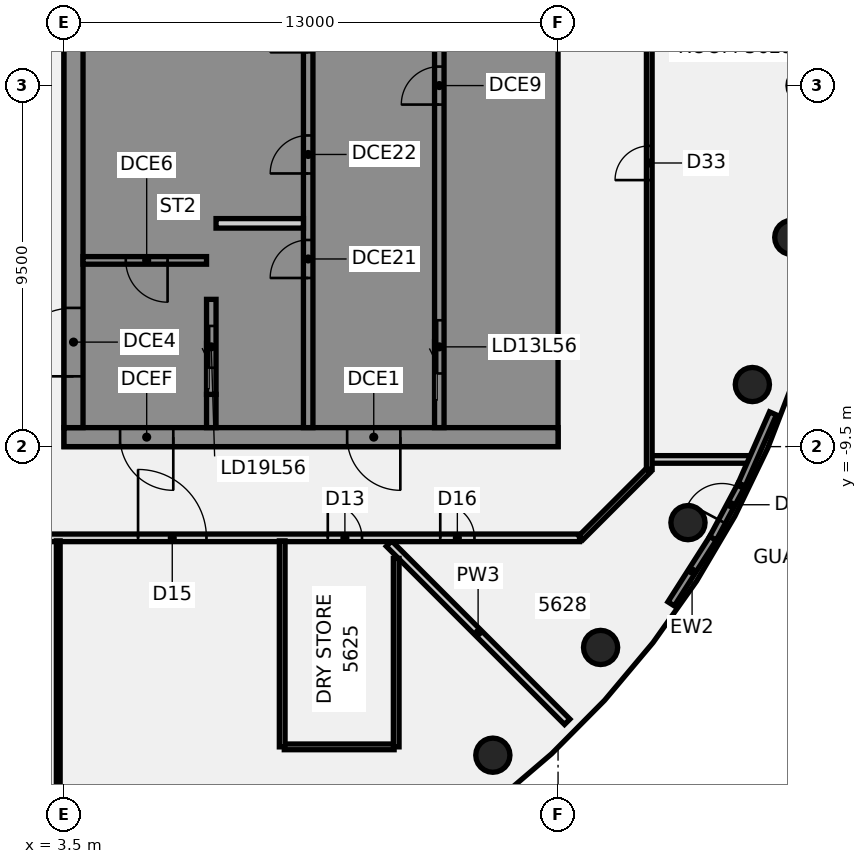
"""IFC4 building model, lengths in metres.
Left out: names, types, materials, properties, quantities, classifications, styles, units other than length and angle.
Written with IfcOpenShell. Run it as: python <this file> out.ifc"""

import sys

from ifc_helpers import new_model, si_unit, direction, frame, frame_2d, origin, origin_2d, place, context, subcontext, project, spatial, polyline, rectangle, circle, outline, extrude, element, fill, save


model = new_model("IFC4")
c1 = context("Model", 3, precision=1e-05, world=origin(), true_north=direction((0.0, 1.0)))
c2 = subcontext(c1, "Body", "Model", "MODEL_VIEW")
j1 = project(units=[si_unit("LENGTHUNIT", "METRE"), si_unit("PLANEANGLEUNIT", "RADIAN")], contexts=[c1])
p1 = place(None, origin())
s1 = spatial("IfcSite", under=j1, at=p1, CompositionType="ELEMENT")
p2 = place(p1, origin())
s2 = spatial("IfcBuilding", under=s1, at=p2, CompositionType="ELEMENT")
p3 = place(p2, frame((0.0, 0.0, 223.5)))
s3 = spatial("IfcBuildingStorey", under=s2, at=p3, CompositionType="ELEMENT", Elevation=223.5)
for number, where, z_axis, x_axis in (
    (1, (14.784, -17.619, -0.14), (0.0, 0.0, 1.0), (1.0, 0.0, 0.0)),
    (2, (17.619, -14.784, -0.14), (0.0, 0.0, 1.0), (1.0, 0.0, 0.0)),
    (3, (19.919, -11.5, -0.14), (0.0, 0.0, 1.0), (1.0, 0.0, 0.0)),
    (4, (21.613, -7.866, -0.14), (0.0, 0.0, 1.0), (1.0, 0.0, 0.0)),
    (5, (22.651, -3.994, -0.14), (0.0, 0.0, 1.0), (1.0, 0.0, 0.0)),
):
    element("IfcColumn", number, at=place(p3, frame(where, z_axis=z_axis, x_axis=x_axis)), inside=s3, PredefinedType="COLUMN", context=c2, shape_type="SweptSolid", body=[
        extrude(circle(Radius=0.45, at=origin_2d()), origin(), (0.0, 0.0, 1.0), 3.6),
    ])
p4 = place(p3, frame((12.052, -12.052, 0.0), z_axis=(0.0, 0.0, 1.0), x_axis=(0.707106781187, -0.707106781187, 0.0)))
e6 = element("IfcWall", 6, at=p4, inside=s3, PredefinedType="PARTITIONING", context=c2, shape_type="SweptSolid", body=[
    extrude(rectangle(XDim=6.631, YDim=0.2, at=frame_2d((3.315, 0.0))), origin(), (0.0, 0.0, 1.0), 2.864),
])
p5 = place(p3, frame((-17.1, -11.9, 0.0), z_axis=(0.0, 0.0, 1.0), x_axis=(1.0, 0.0, 0.0)))
e7 = element("IfcWall", 7, at=p5, inside=s3, PredefinedType="PARTITIONING", context=c2, shape_type="SweptSolid", body=[
    extrude(rectangle(XDim=34.165, YDim=0.2, at=frame_2d((17.083, 0.0))), origin(), (0.0, 0.0, 1.0), 2.864),
])
p6 = place(p5, frame((7.75, 0.0, 0.0)))
e8 = element("IfcOpeningElement", 8, at=p6, cuts=e7, PredefinedType="OPENING", context=c2, shape_type="SweptSolid", body=[
    extrude(rectangle(XDim=0.9, YDim=2.1, at=frame_2d((0.45, 1.05))), frame((0.0, 0.11, 0.0), z_axis=(0.0, -1.0, 0.0), x_axis=(1.0, 0.0, 0.0)), (0.0, 0.0, 1.0), 0.22),
])
p7 = place(p5, frame((27.541, 0.0, 0.0)))
e9 = element("IfcOpeningElement", 9, at=p7, cuts=e7, PredefinedType="OPENING", context=c2, shape_type="SweptSolid", body=[
    extrude(rectangle(XDim=0.9, YDim=2.1, at=frame_2d((0.45, 1.05))), frame((0.0, 0.11, 0.0), z_axis=(0.0, -1.0, 0.0), x_axis=(1.0, 0.0, 0.0)), (0.0, 0.0, 1.0), 0.22),
])
p8 = place(p5, frame((16.059, 0.0, 0.0)))
e10 = element("IfcOpeningElement", 10, at=p8, cuts=e7, PredefinedType="OPENING", context=c2, shape_type="SweptSolid", body=[
    extrude(rectangle(XDim=1.8, YDim=2.1, at=frame_2d((0.9, 1.05))), frame((0.0, 0.11, 0.0), z_axis=(0.0, -1.0, 0.0), x_axis=(1.0, 0.0, 0.0)), (0.0, 0.0, 1.0), 0.22),
])
p9 = place(p5, frame((22.548, 0.0, 0.0)))
e11 = element("IfcOpeningElement", 11, at=p9, cuts=e7, PredefinedType="OPENING", context=c2, shape_type="SweptSolid", body=[
    extrude(rectangle(XDim=1.8, YDim=2.1, at=frame_2d((0.9, 1.05))), frame((0.0, 0.11, 0.0), z_axis=(0.0, -1.0, 0.0), x_axis=(1.0, 0.0, 0.0)), (0.0, 0.0, 1.0), 0.22),
])
p10 = place(p5, frame((30.5, 0.0, 0.0)))
e12 = element("IfcOpeningElement", 12, at=p10, cuts=e7, PredefinedType="OPENING", context=c2, shape_type="SweptSolid", body=[
    extrude(rectangle(XDim=0.9, YDim=2.1, at=frame_2d((0.45, 1.05))), frame((0.0, 0.11, 0.0), z_axis=(0.0, -1.0, 0.0), x_axis=(1.0, 0.0, 0.0)), (0.0, 0.0, 1.0), 0.22),
])
p11 = place(p5, frame((1.65, 0.0, 0.0)))
e13 = element("IfcOpeningElement", 13, at=p11, cuts=e7, PredefinedType="OPENING", context=c2, shape_type="SweptSolid", body=[
    extrude(rectangle(XDim=0.9, YDim=2.1, at=frame_2d((0.45, 1.05))), frame((0.0, 0.11, 0.0), z_axis=(0.0, -1.0, 0.0), x_axis=(1.0, 0.0, 0.0)), (0.0, 0.0, 1.0), 0.22),
])
p12 = place(p3, frame((9.296, -17.4, 0.0), z_axis=(0.0, 0.0, 1.0), x_axis=(1.0, 0.0, 0.0)))
e14 = element("IfcWall", 14, at=p12, inside=s3, PredefinedType="PARTITIONING", context=c2, shape_type="SweptSolid", body=[
    extrude(rectangle(XDim=2.89, YDim=0.15, at=frame_2d((1.445, 0.0))), origin(), (0.0, 0.0, 1.0), 2.864),
])
p13 = place(p3, frame((18.955, -9.837, 0.0), z_axis=(0.0, 0.0, 1.0), x_axis=(1.0, 0.0, 0.0)))
e15 = element("IfcWall", 15, at=p13, inside=s3, PredefinedType="PARTITIONING", context=c2, shape_type="SweptSolid", body=[
    extrude(rectangle(XDim=2.585, YDim=0.2, at=frame_2d((1.292, 0.0))), origin(), (0.0, 0.0, 1.0), 2.864),
])
p14 = place(p3, frame((17.1, -11.9, 0.0), z_axis=(0.0, 0.0, 1.0), x_axis=(0.707106781187, 0.707106781187, 0.0)))
e16 = element("IfcWall", 16, at=p14, inside=s3, PredefinedType="PARTITIONING", context=c2, shape_type="SweptSolid", body=[
    extrude(rectangle(XDim=2.505, YDim=0.15, at=frame_2d((1.253, 0.0))), origin(), (0.0, 0.0, 1.0), 2.864),
])
p15 = place(p3, frame((3.348, -23.439, 0.0), z_axis=(0.0, 0.0, 1.0), x_axis=(0.0, 1.0, 0.0)))
e17 = element("IfcWall", 17, at=p15, inside=s3, PredefinedType="PARTITIONING", context=c2, shape_type="SweptSolid", body=[
    extrude(rectangle(XDim=11.459, YDim=0.1, at=frame_2d((5.729, 0.0))), origin(), (0.0, 0.0, 1.0), 2.864),
])
p16 = place(p3, frame((9.241, -17.4, 0.0), z_axis=(0.0, 0.0, 1.0), x_axis=(0.0, 1.0, 0.0)))
e18 = element("IfcWall", 18, at=p16, inside=s3, PredefinedType="PARTITIONING", context=c2, shape_type="SweptSolid", body=[
    extrude(rectangle(XDim=5.42, YDim=0.15, at=frame_2d((2.71, 0.0))), origin(), (0.0, 0.0, 1.0), 2.864),
])
p17 = place(p3, frame((12.241, -17.4, 0.0), z_axis=(0.0, 0.0, 1.0), x_axis=(0.0, 1.0, 0.0)))
e19 = element("IfcWall", 19, at=p17, inside=s3, PredefinedType="PARTITIONING", context=c2, shape_type="SweptSolid", body=[
    extrude(rectangle(XDim=4.959, YDim=0.15, at=frame_2d((2.479, 0.0))), origin(), (0.0, 0.0, 1.0), 2.864),
])
p18 = place(p3, frame((18.9, -10.1, 0.0), z_axis=(0.0, 0.0, 1.0), x_axis=(0.0, 1.0, 0.0)))
e20 = element("IfcWall", 20, at=p18, inside=s3, PredefinedType="PARTITIONING", context=c2, shape_type="SweptSolid", body=[
    extrude(rectangle(XDim=20.2, YDim=0.15, at=frame_2d((10.1, 0.0))), origin(), (0.0, 0.0, 1.0), 2.864),
])
p19 = place(p18, frame((7.613, 0.0, 0.0)))
e21 = element("IfcOpeningElement", 21, at=p19, cuts=e20, PredefinedType="OPENING", context=c2, shape_type="SweptSolid", body=[
    extrude(rectangle(XDim=0.9, YDim=2.1, at=frame_2d((0.45, 1.05))), frame((0.0, 0.085, 0.0), z_axis=(0.0, -1.0, 0.0), x_axis=(1.0, 0.0, 0.0)), (0.0, 0.0, 1.0), 0.17),
])
for number, where, z_axis, x_axis in (
    (22, (19.476, -13.638, 0.0), (0.0, 0.0, 1.0), (0.538, 0.843, 0.0)),
    (23, (21.331, -10.501, 0.0), (0.0, 0.0, 1.0), (0.402, 0.915, 0.0)),
):
    element("IfcWall", number, at=place(p3, frame(where, z_axis=z_axis, x_axis=x_axis)), inside=s3, PredefinedType="SOLIDWALL", context=c2, shape_type="SweptSolid", body=[
        extrude(rectangle(XDim=2.049, YDim=0.2, at=frame_2d((1.024, 0.0))), origin(), (0.0, 0.0, 1.0), 3.46),
    ])
p20 = place(p3, frame((20.578, -11.911, 0.0), z_axis=(0.0, 0.0, 1.0), x_axis=(0.471483774062, 0.881874736454, 0.0)))
e24 = element("IfcWall", 24, at=p20, inside=s3, PredefinedType="SOLIDWALL", context=c2, shape_type="SweptSolid", body=[
    extrude(rectangle(XDim=1.598, YDim=0.2, at=frame_2d((0.799, 0.0))), origin(), (0.0, 0.0, 1.0), 3.46),
])
p21 = place(p20, frame((0.5, 0.0, 0.0)))
e25 = element("IfcOpeningElement", 25, at=p21, cuts=e24, PredefinedType="OPENING", context=c2, shape_type="SweptSolid", body=[
    extrude(rectangle(XDim=1.0, YDim=2.4, at=frame_2d((0.5, 1.2))), frame((0.0, 0.11, 0.0), z_axis=(0.0, -1.0, 0.0), x_axis=(1.0, 0.0, 0.0)), (0.0, 0.0, 1.0), 0.22),
])
p22 = place(p3, frame((16.5, -9.25, 0.0), z_axis=(0.0, 0.0, 1.0), x_axis=(-1.0, 0.0, 0.0)))
e26 = element("IfcWall", 26, at=p22, inside=s3, PredefinedType="SHEAR", context=c2, shape_type="SweptSolid", body=[
    extrude(rectangle(XDim=13.0, YDim=0.5, at=frame_2d((6.5, 0.0))), origin(), (0.0, 0.0, 1.0), 3.46),
])
p23 = place(p22, frame((4.15, 0.0, 0.0)))
e27 = element("IfcOpeningElement", 27, at=p23, cuts=e26, PredefinedType="OPENING", context=c2, shape_type="SweptSolid", body=[
    extrude(rectangle(XDim=1.4, YDim=2.1, at=frame_2d((0.7, 1.05))), frame((0.0, 0.26, 0.0), z_axis=(0.0, -1.0, 0.0), x_axis=(1.0, 0.0, 0.0)), (0.0, 0.0, 1.0), 0.52),
])
p24 = place(p22, frame((10.125, 0.0, 0.0)))
e28 = element("IfcOpeningElement", 28, at=p24, cuts=e26, PredefinedType="OPENING", context=c2, shape_type="SweptSolid", body=[
    extrude(rectangle(XDim=1.4, YDim=2.1, at=frame_2d((0.7, 1.05))), frame((0.0, 0.26, 0.0), z_axis=(0.0, -1.0, 0.0), x_axis=(1.0, 0.0, 0.0)), (0.0, 0.0, 1.0), 0.52),
])
p25 = place(p3, origin())
e29 = element("IfcWall", 29, at=p25, inside=s3, PredefinedType="SHEAR", context=c2, shape_type="SweptSolid", body=[
    extrude(outline(polyline([(13.5, -8.125), (13.5, -9.0), (16.0, -9.0), (16.5, -9.0), (16.5, 9.0), (16.0, 9.0), (13.5, 9.0), (13.5, 8.125), (16.0, 8.125), (16.0, 5.625), (13.5, 5.625), (13.5, 5.375), (16.0, 5.375), (16.0, -5.375), (13.5, -5.375), (13.5, -5.625), (16.0, -5.625), (16.0, -8.125), (13.5, -8.125)])), origin(), (0.0, 0.0, 1.0), 3.46),
])
p26 = place(p3, origin())
e30 = element("IfcWall", 30, at=p26, inside=s3, PredefinedType="SHEAR", context=c2, shape_type="SweptSolid", body=[
    extrude(outline(polyline([(9.8, -5.375), (7.5, -5.375), (7.5, 2.625), (9.8, 2.625), (9.8, 2.875), (7.5, 2.875), (7.5, 5.375), (9.8, 5.375), (9.8, 5.625), (7.5, 5.625), (7.5, 8.125), (9.8, 8.125), (9.8, 9.0), (7.5, 9.0), (7.25, 9.0), (7.25, -5.625), (7.5, -5.625), (9.8, -5.625), (9.8, -5.375)])), origin(), (0.0, 0.0, 1.0), 3.46),
])
p27 = place(p3, origin())
e31 = element("IfcWall", 31, at=p27, inside=s3, PredefinedType="SHEAR", context=c2, shape_type="SweptSolid", body=[
    extrude(outline(polyline([(7.5, -8.125), (7.5, -9.0), (9.8, -9.0), (9.8, -8.125), (9.8, -5.625), (9.55, -5.625), (9.55, -8.125), (7.5, -8.125)])), origin(), (0.0, 0.0, 1.0), 3.46),
])
p28 = place(p3, frame((7.375, -9.0, 0.0), z_axis=(0.0, 0.0, 1.0), x_axis=(0.0, 1.0, 0.0)))
e32 = element("IfcWall", 32, at=p28, inside=s3, PredefinedType="SHEAR", context=c2, shape_type="SweptSolid", body=[
    extrude(rectangle(XDim=0.875, YDim=0.25, at=frame_2d((0.438, 0.0))), origin(), (0.0, 0.0, 1.0), 3.46),
])
p29 = place(p3, frame((13.375, -9.0, 0.0), z_axis=(0.0, 0.0, 1.0), x_axis=(0.0, 1.0, 0.0)))
e33 = element("IfcWall", 33, at=p29, inside=s3, PredefinedType="SHEAR", context=c2, shape_type="SweptSolid", body=[
    extrude(rectangle(XDim=18.0, YDim=0.25, at=frame_2d((9.0, 0.0))), origin(), (0.0, 0.0, 1.0), 3.46),
])
p30 = place(p29, frame((1.425, 0.0, 0.0)))
e34 = element("IfcOpeningElement", 34, at=p30, cuts=e33, PredefinedType="OPENING", context=c2, shape_type="SweptSolid", body=[
    extrude(rectangle(XDim=1.4, YDim=2.1, at=frame_2d((0.7, 1.05))), frame((0.0, 0.135, 0.0), z_axis=(0.0, -1.0, 0.0), x_axis=(1.0, 0.0, 0.0)), (0.0, 0.0, 1.0), 0.27),
])
p31 = place(p29, frame((8.5, 0.0, 0.0)))
e35 = element("IfcOpeningElement", 35, at=p31, cuts=e33, PredefinedType="OPENING", context=c2, shape_type="SweptSolid", body=[
    extrude(rectangle(XDim=1.0, YDim=2.1, at=frame_2d((0.5, 1.05))), frame((0.0, 0.135, 0.0), z_axis=(0.0, -1.0, 0.0), x_axis=(1.0, 0.0, 0.0)), (0.0, 0.0, 1.0), 0.27),
])
p32 = place(p3, frame((9.925, -9.0, 0.0), z_axis=(0.0, 0.0, 1.0), x_axis=(0.0, 1.0, 0.0)))
e36 = element("IfcWall", 36, at=p32, inside=s3, PredefinedType="SHEAR", context=c2, shape_type="SweptSolid", body=[
    extrude(rectangle(XDim=18.0, YDim=0.25, at=frame_2d((9.0, 0.0))), origin(), (0.0, 0.0, 1.0), 3.46),
])
p33 = place(p32, frame((12.575, 0.0, 0.0)))
e37 = element("IfcOpeningElement", 37, at=p33, cuts=e36, PredefinedType="OPENING", context=c2, shape_type="SweptSolid", body=[
    extrude(rectangle(XDim=1.1, YDim=2.1, at=frame_2d((0.55, 1.05))), frame((0.0, 0.135, 0.0), z_axis=(0.0, -1.0, 0.0), x_axis=(1.0, 0.0, 0.0)), (0.0, 0.0, 1.0), 0.27),
])
p34 = place(p32, frame((15.325, 0.0, 0.0)))
e38 = element("IfcOpeningElement", 38, at=p34, cuts=e36, PredefinedType="OPENING", context=c2, shape_type="SweptSolid", body=[
    extrude(rectangle(XDim=1.1, YDim=2.1, at=frame_2d((0.55, 1.05))), frame((0.0, 0.135, 0.0), z_axis=(0.0, -1.0, 0.0), x_axis=(1.0, 0.0, 0.0)), (0.0, 0.0, 1.0), 0.27),
])
p35 = place(p32, frame((3.938, 0.0, 0.0)))
e39 = element("IfcOpeningElement", 39, at=p35, cuts=e36, PredefinedType="OPENING", context=c2, shape_type="SweptSolid", body=[
    extrude(rectangle(XDim=1.0, YDim=2.1, at=frame_2d((0.5, 1.05))), frame((0.0, 0.135, 0.0), z_axis=(0.0, -1.0, 0.0), x_axis=(1.0, 0.0, 0.0)), (0.0, 0.0, 1.0), 0.27),
])
p36 = place(p32, frame((6.688, 0.0, 0.0)))
e40 = element("IfcOpeningElement", 40, at=p36, cuts=e36, PredefinedType="OPENING", context=c2, shape_type="SweptSolid", body=[
    extrude(rectangle(XDim=1.0, YDim=2.1, at=frame_2d((0.5, 1.05))), frame((0.0, 0.135, 0.0), z_axis=(0.0, -1.0, 0.0), x_axis=(1.0, 0.0, 0.0)), (0.0, 0.0, 1.0), 0.27),
])
p37 = place(p32, frame((9.875, 0.0, 0.0)))
e41 = element("IfcOpeningElement", 41, at=p37, cuts=e36, PredefinedType="OPENING", context=c2, shape_type="SweptSolid", body=[
    extrude(rectangle(XDim=1.0, YDim=2.1, at=frame_2d((0.5, 1.05))), frame((0.0, 0.135, 0.0), z_axis=(0.0, -1.0, 0.0), x_axis=(1.0, 0.0, 0.0)), (0.0, 0.0, 1.0), 0.27),
])
p38 = place(p3, frame((7.375, -8.125, 0.0), z_axis=(0.0, 0.0, 1.0), x_axis=(0.0, 1.0, 0.0)))
e42 = element("IfcWall", 42, at=p38, inside=s3, PredefinedType="SHEAR", context=c2, shape_type="SweptSolid", body=[
    extrude(rectangle(XDim=2.5, YDim=0.25, at=frame_2d((1.25, 0.0))), origin(), (0.0, 0.0, 1.0), 3.46),
])
p39 = place(p38, frame((0.7, 0.0, 0.0)))
e43 = element("IfcOpeningElement", 43, at=p39, cuts=e42, PredefinedType="OPENING", context=c2, shape_type="SweptSolid", body=[
    extrude(rectangle(XDim=1.1, YDim=2.1, at=frame_2d((0.55, 1.05))), frame((0.0, 0.135, 0.0), z_axis=(0.0, -1.0, 0.0), x_axis=(1.0, 0.0, 0.0)), (0.0, 0.0, 1.0), 0.27),
])
p40 = place(p3, frame((3.75, -9.0, 0.0), z_axis=(0.0, 0.0, 1.0), x_axis=(0.0, 1.0, 0.0)))
e44 = element("IfcWall", 44, at=p40, inside=s3, PredefinedType="SHEAR", context=c2, shape_type="SweptSolid", body=[
    extrude(rectangle(XDim=18.0, YDim=0.5, at=frame_2d((9.0, 0.0))), origin(), (0.0, 0.0, 1.0), 3.46),
])
p41 = place(p40, frame((1.35, 0.0, 0.0)))
e45 = element("IfcOpeningElement", 45, at=p41, cuts=e44, PredefinedType="OPENING", context=c2, shape_type="SweptSolid", body=[
    extrude(rectangle(XDim=1.8, YDim=2.1, at=frame_2d((0.9, 1.05))), frame((0.0, 0.26, 0.0), z_axis=(0.0, -1.0, 0.0), x_axis=(1.0, 0.0, 0.0)), (0.0, 0.0, 1.0), 0.52),
])
p42 = place(p40, frame((12.478, 0.0, 0.0)))
e46 = element("IfcOpeningElement", 46, at=p42, cuts=e44, PredefinedType="OPENING", context=c2, shape_type="SweptSolid", body=[
    extrude(rectangle(XDim=1.0, YDim=2.1, at=frame_2d((0.5, 1.05))), frame((0.0, 0.26, 0.0), z_axis=(0.0, -1.0, 0.0), x_axis=(1.0, 0.0, 0.0)), (0.0, 0.0, 1.0), 0.52),
])
p43 = place(p40, frame((16.002, 0.0, 0.0)))
e47 = element("IfcOpeningElement", 47, at=p43, cuts=e44, PredefinedType="OPENING", context=c2, shape_type="SweptSolid", body=[
    extrude(rectangle(XDim=1.0, YDim=2.1, at=frame_2d((0.5, 1.05))), frame((0.0, 0.26, 0.0), z_axis=(0.0, -1.0, 0.0), x_axis=(1.0, 0.0, 0.0)), (0.0, 0.0, 1.0), 0.52),
])
p44 = place(p3, frame((7.25, -4.6, 0.0), z_axis=(0.0, 0.0, 1.0), x_axis=(-1.0, 0.0, 0.0)))
e48 = element("IfcWall", 48, at=p44, inside=s3, PredefinedType="SHEAR", context=c2, shape_type="SweptSolid", body=[
    extrude(rectangle(XDim=3.25, YDim=0.2, at=frame_2d((1.625, 0.0))), origin(), (0.0, 0.0, 1.0), 3.46),
])
p45 = place(p44, frame((1.025, 0.0, 0.0)))
e49 = element("IfcOpeningElement", 49, at=p45, cuts=e48, PredefinedType="OPENING", context=c2, shape_type="SweptSolid", body=[
    extrude(rectangle(XDim=1.1, YDim=2.1, at=frame_2d((0.55, 1.05))), frame((0.0, 0.11, 0.0), z_axis=(0.0, -1.0, 0.0), x_axis=(1.0, 0.0, 0.0)), (0.0, 0.0, 1.0), 0.22),
])
p46 = place(p3, frame((9.8, -3.625, 0.0), z_axis=(0.0, 0.0, 1.0), x_axis=(-1.0, 0.0, 0.0)))
e50 = element("IfcWall", 50, at=p46, inside=s3, PredefinedType="PARTITIONING", context=c2, shape_type="SweptSolid", body=[
    extrude(rectangle(XDim=2.3, YDim=0.25, at=frame_2d((1.15, 0.0))), origin(), (0.0, 0.0, 1.0), 3.46),
])
p47 = place(p7, frame((0.9, 0.0, 0.0), z_axis=(0.0, 0.0, 1.0), x_axis=(-1.0, 0.0, 0.0)))
e51 = element("IfcDoor", 51, at=p47, inside=s3, OperationType="SINGLE_SWING_RIGHT", PredefinedType="DOOR", context=c2, shape_type="SweptSolid", body=[
    extrude(rectangle(XDim=0.9, YDim=2.1, at=frame_2d((0.45, 1.05))), frame((0.0, 0.025, 0.0), z_axis=(0.0, -1.0, 0.0), x_axis=(1.0, 0.0, 0.0)), (0.0, 0.0, 1.0), 0.05),
])
fill(e9, e51)
p48 = place(p9, frame((1.8, 0.0, 0.0), z_axis=(0.0, 0.0, 1.0), x_axis=(-1.0, 0.0, 0.0)))
e52 = element("IfcDoor", 52, at=p48, inside=s3, OperationType="DOUBLE_DOOR_SINGLE_SWING", PredefinedType="DOOR", context=c2, shape_type="SweptSolid", body=[
    extrude(rectangle(XDim=1.8, YDim=2.1, at=frame_2d((0.9, 1.05))), frame((0.0, 0.025, 0.0), z_axis=(0.0, -1.0, 0.0), x_axis=(1.0, 0.0, 0.0)), (0.0, 0.0, 1.0), 0.05),
])
fill(e11, e52)
p49 = place(p10, frame((0.9, 0.0, 0.0), z_axis=(0.0, 0.0, 1.0), x_axis=(-1.0, 0.0, 0.0)))
e53 = element("IfcDoor", 53, at=p49, inside=s3, OperationType="SINGLE_SWING_RIGHT", PredefinedType="DOOR", context=c2, shape_type="SweptSolid", body=[
    extrude(rectangle(XDim=0.9, YDim=2.1, at=frame_2d((0.45, 1.05))), frame((0.0, 0.025, 0.0), z_axis=(0.0, -1.0, 0.0), x_axis=(1.0, 0.0, 0.0)), (0.0, 0.0, 1.0), 0.05),
])
fill(e12, e53)
p50 = place(p19, frame((0.9, 0.0, 0.0), z_axis=(0.0, 0.0, 1.0), x_axis=(-1.0, 0.0, 0.0)))
e54 = element("IfcDoor", 54, at=p50, inside=s3, OperationType="SINGLE_SWING_LEFT", PredefinedType="DOOR", context=c2, shape_type="SweptSolid", body=[
    extrude(rectangle(XDim=0.9, YDim=2.1, at=frame_2d((0.45, 1.05))), frame((0.0, 0.025, 0.0), z_axis=(0.0, -1.0, 0.0), x_axis=(1.0, 0.0, 0.0)), (0.0, 0.0, 1.0), 0.05),
])
fill(e21, e54)
p51 = place(p21, origin())
e55 = element("IfcDoor", 55, at=p51, inside=s3, OperationType="SINGLE_SWING_LEFT", PredefinedType="DOOR", context=c2, shape_type="SweptSolid", body=[
    extrude(rectangle(XDim=1.0, YDim=2.4, at=frame_2d((0.5, 1.2))), frame((0.0, 0.025, 0.0), z_axis=(0.0, -1.0, 0.0), x_axis=(1.0, 0.0, 0.0)), (0.0, 0.0, 1.0), 0.05),
])
fill(e25, e55)
p52 = place(p23, origin())
e56 = element("IfcDoor", 56, at=p52, inside=s3, OperationType="SINGLE_SWING_LEFT", PredefinedType="DOOR", context=c2, shape_type="SweptSolid", body=[
    extrude(rectangle(XDim=1.4, YDim=2.1, at=frame_2d((0.7, 1.05))), frame((0.0, 0.025, 0.0), z_axis=(0.0, -1.0, 0.0), x_axis=(1.0, 0.0, 0.0)), (0.0, 0.0, 1.0), 0.05),
])
fill(e27, e56)
p53 = place(p24, origin())
e57 = element("IfcDoor", 57, at=p53, inside=s3, OperationType="SINGLE_SWING_LEFT", PredefinedType="DOOR", context=c2, shape_type="SweptSolid", body=[
    extrude(rectangle(XDim=1.4, YDim=2.1, at=frame_2d((0.7, 1.05))), frame((0.0, 0.025, 0.0), z_axis=(0.0, -1.0, 0.0), x_axis=(1.0, 0.0, 0.0)), (0.0, 0.0, 1.0), 0.05),
])
fill(e28, e57)
p54 = place(p41, origin())
e58 = element("IfcDoor", 58, at=p54, inside=s3, OperationType="SINGLE_SWING_LEFT", PredefinedType="DOOR", context=c2, shape_type="SweptSolid", body=[
    extrude(rectangle(XDim=1.8, YDim=2.1, at=frame_2d((0.9, 1.05))), frame((0.0, 0.025, 0.0), z_axis=(0.0, -1.0, 0.0), x_axis=(1.0, 0.0, 0.0)), (0.0, 0.0, 1.0), 0.05),
])
fill(e45, e58)
p55 = place(p45, origin())
e59 = element("IfcDoor", 59, at=p55, inside=s3, OperationType="SINGLE_SWING_LEFT", PredefinedType="DOOR", context=c2, shape_type="SweptSolid", body=[
    extrude(rectangle(XDim=1.1, YDim=2.1, at=frame_2d((0.55, 1.05))), frame((0.0, 0.025, 0.0), z_axis=(0.0, -1.0, 0.0), x_axis=(1.0, 0.0, 0.0)), (0.0, 0.0, 1.0), 0.05),
])
fill(e49, e59)
p56 = place(p30, origin())
e60 = element("IfcDoor", 60, at=p56, inside=s3, OperationType="SLIDING_TO_LEFT", PredefinedType="DOOR", context=c2, shape_type="SweptSolid", body=[
    extrude(rectangle(XDim=1.4, YDim=2.1, at=frame_2d((0.7, 1.05))), frame((0.0, 0.025, 0.0), z_axis=(0.0, -1.0, 0.0), x_axis=(1.0, 0.0, 0.0)), (0.0, 0.0, 1.0), 0.05),
])
fill(e34, e60)
p57 = place(p39, origin())
e61 = element("IfcDoor", 61, at=p57, inside=s3, OperationType="SLIDING_TO_LEFT", PredefinedType="DOOR", context=c2, shape_type="SweptSolid", body=[
    extrude(rectangle(XDim=1.1, YDim=2.1, at=frame_2d((0.55, 1.05))), frame((0.0, 0.025, 0.0), z_axis=(0.0, -1.0, 0.0), x_axis=(1.0, 0.0, 0.0)), (0.0, 0.0, 1.0), 0.05),
])
fill(e43, e61)
p58 = place(p31, origin())
e62 = element("IfcDoor", 62, at=p58, inside=s3, OperationType="SINGLE_SWING_LEFT", PredefinedType="DOOR", context=c2, shape_type="SweptSolid", body=[
    extrude(rectangle(XDim=1.0, YDim=2.1, at=frame_2d((0.5, 1.05))), frame((0.0, 0.025, 0.0), z_axis=(0.0, -1.0, 0.0), x_axis=(1.0, 0.0, 0.0)), (0.0, 0.0, 1.0), 0.05),
])
fill(e35, e62)
p59 = place(p35, origin())
e63 = element("IfcDoor", 63, at=p59, inside=s3, OperationType="SINGLE_SWING_LEFT", PredefinedType="DOOR", context=c2, shape_type="SweptSolid", body=[
    extrude(rectangle(XDim=1.0, YDim=2.1, at=frame_2d((0.5, 1.05))), frame((0.0, 0.025, 0.0), z_axis=(0.0, -1.0, 0.0), x_axis=(1.0, 0.0, 0.0)), (0.0, 0.0, 1.0), 0.05),
])
fill(e39, e63)
p60 = place(p36, origin())
e64 = element("IfcDoor", 64, at=p60, inside=s3, OperationType="SINGLE_SWING_LEFT", PredefinedType="DOOR", context=c2, shape_type="SweptSolid", body=[
    extrude(rectangle(XDim=1.0, YDim=2.1, at=frame_2d((0.5, 1.05))), frame((0.0, 0.025, 0.0), z_axis=(0.0, -1.0, 0.0), x_axis=(1.0, 0.0, 0.0)), (0.0, 0.0, 1.0), 0.05),
])
fill(e40, e64)
save(model, sys.argv[1])
